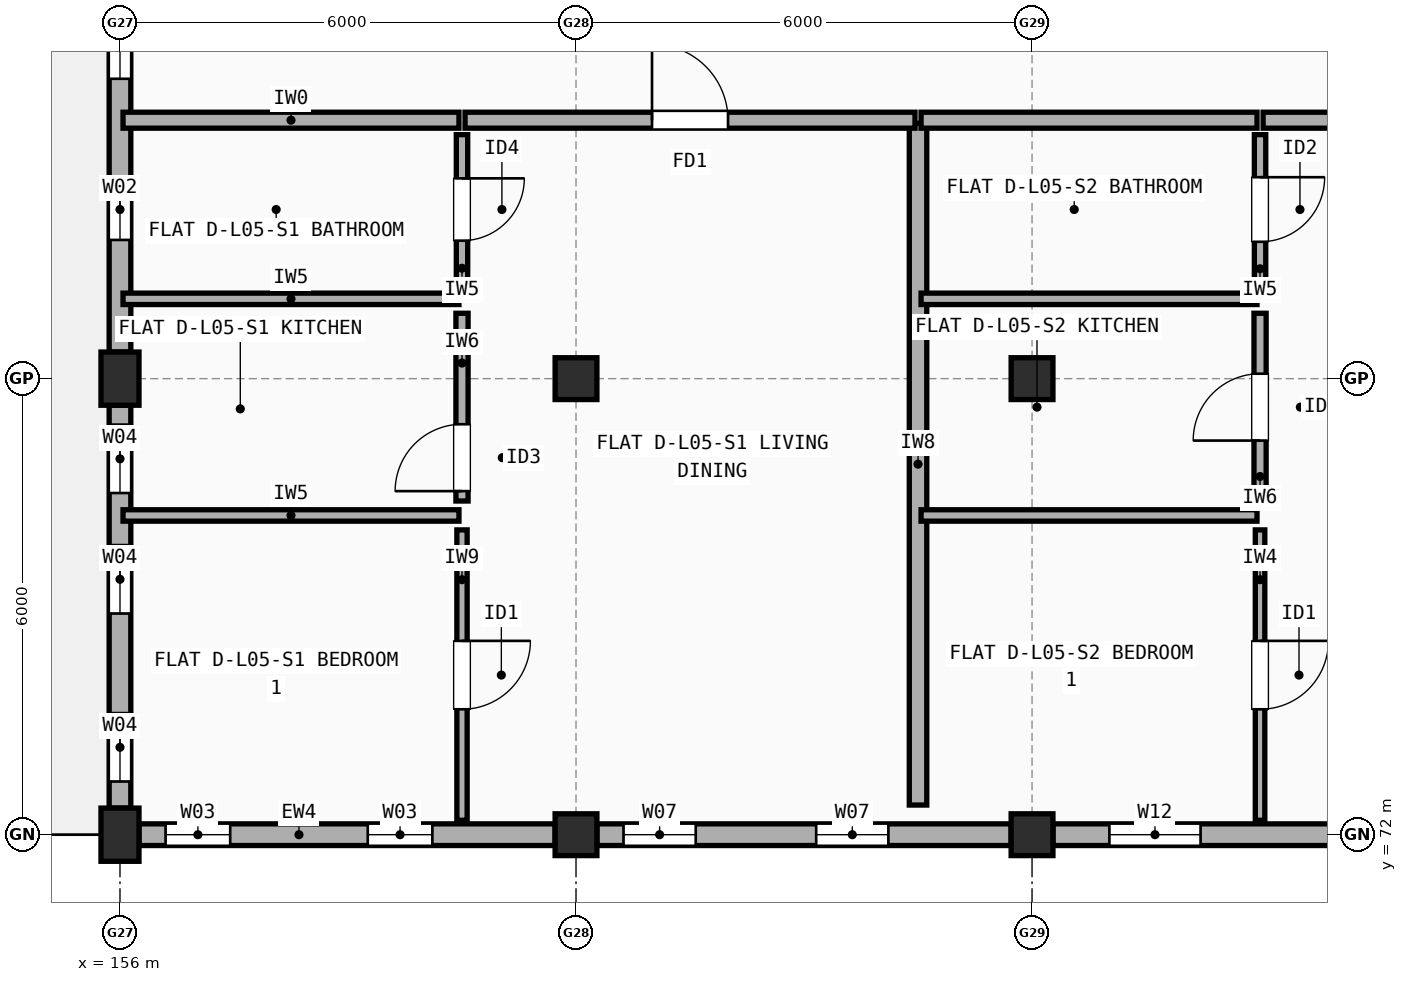
"""IFC4 building model, lengths in metres.
Left out: names, types, materials, properties, quantities, classifications, styles, units other than length and angle.
Written with IfcOpenShell. Run it as: python <this file> out.ifc"""

import sys

from ifc_helpers import new_model, si_unit, direction, frame, frame_2d, origin, origin_2d, place, context, subcontext, project, spatial, rectangle, extrude, element, fill, save


model = new_model("IFC4")
c1 = context("Model", 3, precision=1e-05, world=origin(), true_north=direction((0.0, 1.0)))
c2 = subcontext(c1, "Body", "Model", "MODEL_VIEW")
j1 = project(units=[si_unit("LENGTHUNIT", "METRE"), si_unit("PLANEANGLEUNIT", "RADIAN")], contexts=[c1])
p1 = place(None, origin())
s1 = spatial("IfcSite", under=j1, at=p1, CompositionType="ELEMENT")
p2 = place(p1, origin())
s2 = spatial("IfcBuilding", under=s1, at=p2, CompositionType="ELEMENT")
p3 = place(p2, frame((0.0, 0.0, 17.3)))
s3 = spatial("IfcBuildingStorey", under=s2, at=p3, CompositionType="ELEMENT", Elevation=17.3)
for number, where, z_axis, x_axis in (
    (1, (156.0, 72.0, 0.0), (0.0, 0.0, 1.0), (1.0, 0.0, 0.0)),
    (2, (156.0, 78.0, 0.0), (0.0, 0.0, 1.0), (1.0, 0.0, 0.0)),
):
    element("IfcColumn", number, at=place(p3, frame(where, z_axis=z_axis, x_axis=x_axis)), inside=s3, PredefinedType="COLUMN", context=c2, shape_type="SweptSolid", body=[
        extrude(rectangle(XDim=0.5, YDim=0.7, at=origin_2d()), origin(), (0.0, 0.0, 1.0), 2.965),
    ])
for number, where, z_axis, x_axis in (
    (3, (162.0, 72.0, 0.0), (0.0, 0.0, 1.0), (1.0, 0.0, 0.0)),
    (4, (162.0, 78.0, 0.0), (0.0, 0.0, 1.0), (1.0, 0.0, 0.0)),
    (5, (168.0, 72.0, 0.0), (0.0, 0.0, 1.0), (1.0, 0.0, 0.0)),
    (6, (168.0, 78.0, 0.0), (0.0, 0.0, 1.0), (1.0, 0.0, 0.0)),
):
    element("IfcColumn", number, at=place(p3, frame(where, z_axis=z_axis, x_axis=x_axis)), inside=s3, PredefinedType="COLUMN", context=c2, shape_type="SweptSolid", body=[
        extrude(rectangle(XDim=0.55, YDim=0.55, at=origin_2d()), origin(), (0.0, 0.0, 1.0), 2.965),
    ])
p4 = place(p3, frame((156.25, 72.0, 0.0), z_axis=(0.0, 0.0, 1.0), x_axis=(1.0, 0.0, 0.0)))
e7 = element("IfcWall", 7, at=p4, inside=s3, PredefinedType="STANDARD", context=c2, shape_type="SweptSolid", body=[
    extrude(rectangle(XDim=5.475, YDim=0.285, at=frame_2d((2.738, 0.0))), origin(), (0.0, 0.0, 1.0), 2.447),
])
p5 = place(p4, frame((0.35, 0.0, 0.9)))
e8 = element("IfcOpeningElement", 8, at=p5, cuts=e7, PredefinedType="OPENING", context=c2, shape_type="SweptSolid", body=[
    extrude(rectangle(XDim=0.85, YDim=1.25, at=frame_2d((0.425, 0.625))), frame((0.0, 0.152, 0.0), z_axis=(0.0, -1.0, 0.0), x_axis=(1.0, 0.0, 0.0)), (0.0, 0.0, 1.0), 0.305),
])
p6 = place(p4, frame((3.01, 0.0, 0.9)))
e9 = element("IfcOpeningElement", 9, at=p6, cuts=e7, PredefinedType="OPENING", context=c2, shape_type="SweptSolid", body=[
    extrude(rectangle(XDim=0.85, YDim=1.25, at=frame_2d((0.425, 0.625))), frame((0.0, 0.152, 0.0), z_axis=(0.0, -1.0, 0.0), x_axis=(1.0, 0.0, 0.0)), (0.0, 0.0, 1.0), 0.305),
])
p7 = place(p3, frame((162.275, 72.0, 0.0), z_axis=(0.0, 0.0, 1.0), x_axis=(1.0, 0.0, 0.0)))
e10 = element("IfcWall", 10, at=p7, inside=s3, PredefinedType="STANDARD", context=c2, shape_type="SweptSolid", body=[
    extrude(rectangle(XDim=5.45, YDim=0.285, at=frame_2d((2.725, 0.0))), origin(), (0.0, 0.0, 1.0), 2.447),
])
p8 = place(p7, frame((0.35, 0.0, 0.9)))
e11 = element("IfcOpeningElement", 11, at=p8, cuts=e10, PredefinedType="OPENING", context=c2, shape_type="SweptSolid", body=[
    extrude(rectangle(XDim=0.95, YDim=1.35, at=frame_2d((0.475, 0.675))), frame((0.0, 0.152, 0.0), z_axis=(0.0, -1.0, 0.0), x_axis=(1.0, 0.0, 0.0)), (0.0, 0.0, 1.0), 0.305),
])
p9 = place(p7, frame((2.885, 0.0, 0.9)))
e12 = element("IfcOpeningElement", 12, at=p9, cuts=e10, PredefinedType="OPENING", context=c2, shape_type="SweptSolid", body=[
    extrude(rectangle(XDim=0.95, YDim=1.35, at=frame_2d((0.475, 0.675))), frame((0.0, 0.152, 0.0), z_axis=(0.0, -1.0, 0.0), x_axis=(1.0, 0.0, 0.0)), (0.0, 0.0, 1.0), 0.305),
])
p10 = place(p3, frame((168.275, 72.0, 0.0), z_axis=(0.0, 0.0, 1.0), x_axis=(1.0, 0.0, 0.0)))
e13 = element("IfcWall", 13, at=p10, inside=s3, PredefinedType="STANDARD", context=c2, shape_type="SweptSolid", body=[
    extrude(rectangle(XDim=5.45, YDim=0.285, at=frame_2d((2.725, 0.0))), origin(), (0.0, 0.0, 1.0), 2.447),
])
p11 = place(p10, frame((0.742, 0.0, 0.9)))
e14 = element("IfcOpeningElement", 14, at=p11, cuts=e13, PredefinedType="OPENING", context=c2, shape_type="SweptSolid", body=[
    extrude(rectangle(XDim=1.2, YDim=1.35, at=frame_2d((0.6, 0.675))), frame((0.0, 0.152, 0.0), z_axis=(0.0, -1.0, 0.0), x_axis=(1.0, 0.0, 0.0)), (0.0, 0.0, 1.0), 0.305),
])
p12 = place(p10, frame((3.708, 0.0, 0.9)))
e15 = element("IfcOpeningElement", 15, at=p12, cuts=e13, PredefinedType="OPENING", context=c2, shape_type="SweptSolid", body=[
    extrude(rectangle(XDim=0.8, YDim=1.2, at=frame_2d((0.4, 0.6))), frame((0.0, 0.152, 0.0), z_axis=(0.0, -1.0, 0.0), x_axis=(1.0, 0.0, 0.0)), (0.0, 0.0, 1.0), 0.305),
])
p13 = place(p3, frame((156.0, 83.65, 0.0), z_axis=(0.0, 0.0, 1.0), x_axis=(0.0, -1.0, 0.0)))
e16 = element("IfcWall", 16, at=p13, inside=s3, PredefinedType="STANDARD", context=c2, shape_type="SweptSolid", body=[
    extrude(rectangle(XDim=5.3, YDim=0.285, at=frame_2d((2.65, 0.0))), origin(), (0.0, 0.0, 1.0), 2.447),
])
p14 = place(p13, frame((0.505, 0.0, 0.9)))
e17 = element("IfcOpeningElement", 17, at=p14, cuts=e16, PredefinedType="OPENING", context=c2, shape_type="SweptSolid", body=[
    extrude(rectangle(XDim=1.2, YDim=1.35, at=frame_2d((0.6, 0.675))), frame((0.0, 0.152, 0.0), z_axis=(0.0, -1.0, 0.0), x_axis=(1.0, 0.0, 0.0)), (0.0, 0.0, 1.0), 0.305),
])
p15 = place(p13, frame((3.025, 0.0, 0.9)))
e18 = element("IfcOpeningElement", 18, at=p15, cuts=e16, PredefinedType="OPENING", context=c2, shape_type="SweptSolid", body=[
    extrude(rectangle(XDim=0.8, YDim=1.2, at=frame_2d((0.4, 0.6))), frame((0.0, 0.152, 0.0), z_axis=(0.0, -1.0, 0.0), x_axis=(1.0, 0.0, 0.0)), (0.0, 0.0, 1.0), 0.305),
])
p16 = place(p3, frame((156.0, 77.65, 0.0), z_axis=(0.0, 0.0, 1.0), x_axis=(0.0, -1.0, 0.0)))
e19 = element("IfcWall", 19, at=p16, inside=s3, PredefinedType="STANDARD", context=c2, shape_type="SweptSolid", body=[
    extrude(rectangle(XDim=5.3, YDim=0.285, at=frame_2d((2.65, 0.0))), origin(), (0.0, 0.0, 1.0), 2.447),
])
p17 = place(p16, frame((0.255, 0.0, 0.9)))
e20 = element("IfcOpeningElement", 20, at=p17, cuts=e19, PredefinedType="OPENING", context=c2, shape_type="SweptSolid", body=[
    extrude(rectangle(XDim=0.9, YDim=1.3, at=frame_2d((0.45, 0.65))), frame((0.0, 0.152, 0.0), z_axis=(0.0, -1.0, 0.0), x_axis=(1.0, 0.0, 0.0)), (0.0, 0.0, 1.0), 0.305),
])
p18 = place(p16, frame((1.84, 0.0, 0.9)))
e21 = element("IfcOpeningElement", 21, at=p18, cuts=e19, PredefinedType="OPENING", context=c2, shape_type="SweptSolid", body=[
    extrude(rectangle(XDim=0.9, YDim=1.3, at=frame_2d((0.45, 0.65))), frame((0.0, 0.152, 0.0), z_axis=(0.0, -1.0, 0.0), x_axis=(1.0, 0.0, 0.0)), (0.0, 0.0, 1.0), 0.305),
])
p19 = place(p16, frame((4.05, 0.0, 0.9)))
e22 = element("IfcOpeningElement", 22, at=p19, cuts=e19, PredefinedType="OPENING", context=c2, shape_type="SweptSolid", body=[
    extrude(rectangle(XDim=0.9, YDim=1.3, at=frame_2d((0.45, 0.65))), frame((0.0, 0.152, 0.0), z_axis=(0.0, -1.0, 0.0), x_axis=(1.0, 0.0, 0.0)), (0.0, 0.0, 1.0), 0.305),
])
p20 = place(p3, frame((166.5, 72.39, 0.0), z_axis=(0.0, 0.0, 1.0), x_axis=(0.0, 1.0, 0.0)))
e23 = element("IfcWall", 23, at=p20, inside=s3, PredefinedType="SOLIDWALL", context=c2, shape_type="SweptSolid", body=[
    extrude(rectangle(XDim=8.97, YDim=0.23, at=frame_2d((4.485, 0.0))), origin(), (0.0, 0.0, 1.0), 2.447),
])
p21 = place(p3, frame((156.04, 81.4, 0.0), z_axis=(0.0, 0.0, 1.0), x_axis=(1.0, 0.0, 0.0)))
e24 = element("IfcWall", 24, at=p21, inside=s3, PredefinedType="SOLIDWALL", context=c2, shape_type="SweptSolid", body=[
    extrude(rectangle(XDim=4.42, YDim=0.21, at=frame_2d((2.21, 0.0))), origin(), (0.0, 0.0, 1.0), 2.447),
])
p22 = place(p3, frame((160.54, 81.4, 0.0), z_axis=(0.0, 0.0, 1.0), x_axis=(1.0, 0.0, 0.0)))
e25 = element("IfcWall", 25, at=p22, inside=s3, PredefinedType="SOLIDWALL", context=c2, shape_type="SweptSolid", body=[
    extrude(rectangle(XDim=5.92, YDim=0.21, at=frame_2d((2.96, 0.0))), origin(), (0.0, 0.0, 1.0), 2.548),
])
p23 = place(p22, frame((2.46, 0.0, 0.0)))
e26 = element("IfcOpeningElement", 26, at=p23, cuts=e25, PredefinedType="OPENING", context=c2, shape_type="SweptSolid", body=[
    extrude(rectangle(XDim=1.0, YDim=2.15, at=frame_2d((0.5, 1.075))), frame((0.0, 0.115, 0.0), z_axis=(0.0, -1.0, 0.0), x_axis=(1.0, 0.0, 0.0)), (0.0, 0.0, 1.0), 0.23),
])
p24 = place(p3, frame((160.5, 72.19, 0.0), z_axis=(0.0, 0.0, 1.0), x_axis=(0.0, 1.0, 0.0)))
e27 = element("IfcWall", 27, at=p24, inside=s3, PredefinedType="PARTITIONING", context=c2, shape_type="SweptSolid", body=[
    extrude(rectangle(XDim=3.82, YDim=0.135, at=frame_2d((1.91, 0.0))), origin(), (0.0, 0.0, 1.0), 2.965),
])
p25 = place(p24, frame((1.46, 0.0, 0.0)))
e28 = element("IfcOpeningElement", 28, at=p25, cuts=e27, PredefinedType="OPENING", context=c2, shape_type="SweptSolid", body=[
    extrude(rectangle(XDim=0.9, YDim=2.1, at=frame_2d((0.45, 1.05))), frame((0.0, 0.077, 0.0), z_axis=(0.0, -1.0, 0.0), x_axis=(1.0, 0.0, 0.0)), (0.0, 0.0, 1.0), 0.155),
])
p26 = place(p3, frame((160.5, 76.39, 0.0), z_axis=(0.0, 0.0, 1.0), x_axis=(0.0, 1.0, 0.0)))
e29 = element("IfcWall", 29, at=p26, inside=s3, PredefinedType="PLUMBINGWALL", context=c2, shape_type="SweptSolid", body=[
    extrude(rectangle(XDim=2.47, YDim=0.16, at=frame_2d((1.235, 0.0))), origin(), (0.0, 0.0, 1.0), 2.447),
])
p27 = place(p26, frame((0.13, 0.0, 0.0)))
e30 = element("IfcOpeningElement", 30, at=p27, cuts=e29, PredefinedType="OPENING", context=c2, shape_type="SweptSolid", body=[
    extrude(rectangle(XDim=0.88, YDim=2.1, at=frame_2d((0.44, 1.05))), frame((0.0, 0.09, 0.0), z_axis=(0.0, -1.0, 0.0), x_axis=(1.0, 0.0, 0.0)), (0.0, 0.0, 1.0), 0.18),
])
p28 = place(p3, frame((160.5, 79.24, 0.0), z_axis=(0.0, 0.0, 1.0), x_axis=(0.0, 1.0, 0.0)))
e31 = element("IfcWall", 31, at=p28, inside=s3, PredefinedType="PARTITIONING", context=c2, shape_type="SweptSolid", body=[
    extrude(rectangle(XDim=1.97, YDim=0.15, at=frame_2d((0.985, 0.0))), origin(), (0.0, 0.0, 1.0), 2.965),
])
p29 = place(p28, frame((0.575, 0.0, 0.0)))
e32 = element("IfcOpeningElement", 32, at=p29, cuts=e31, PredefinedType="OPENING", context=c2, shape_type="SweptSolid", body=[
    extrude(rectangle(XDim=0.82, YDim=2.08, at=frame_2d((0.41, 1.04))), frame((0.0, 0.085, 0.0), z_axis=(0.0, -1.0, 0.0), x_axis=(1.0, 0.0, 0.0)), (0.0, 0.0, 1.0), 0.17),
])
for number, where, z_axis, x_axis in (
    (33, (156.04, 76.2, 0.0), (0.0, 0.0, 1.0), (1.0, 0.0, 0.0)),
    (34, (156.04, 79.05, 0.0), (0.0, 0.0, 1.0), (1.0, 0.0, 0.0)),
):
    element("IfcWall", number, at=place(p3, frame(where, z_axis=z_axis, x_axis=x_axis)), inside=s3, PredefinedType="PARTITIONING", context=c2, shape_type="SweptSolid", body=[
        extrude(rectangle(XDim=4.42, YDim=0.15, at=frame_2d((2.21, 0.0))), origin(), (0.0, 0.0, 1.0), 2.447),
    ])
p30 = place(p3, frame((166.54, 81.4, 0.0), z_axis=(0.0, 0.0, 1.0), x_axis=(1.0, 0.0, 0.0)))
e35 = element("IfcWall", 35, at=p30, inside=s3, PredefinedType="SOLIDWALL", context=c2, shape_type="SweptSolid", body=[
    extrude(rectangle(XDim=4.42, YDim=0.21, at=frame_2d((2.21, 0.0))), origin(), (0.0, 0.0, 1.0), 2.548),
])
p31 = place(p3, frame((171.04, 81.4, 0.0), z_axis=(0.0, 0.0, 1.0), x_axis=(1.0, 0.0, 0.0)))
e36 = element("IfcWall", 36, at=p31, inside=s3, PredefinedType="SOLIDWALL", context=c2, shape_type="SweptSolid", body=[
    extrude(rectangle(XDim=5.92, YDim=0.21, at=frame_2d((2.96, 0.0))), origin(), (0.0, 0.0, 1.0), 2.508),
])
p32 = place(p31, frame((2.47, 0.0, 0.0)))
e37 = element("IfcOpeningElement", 37, at=p32, cuts=e36, PredefinedType="OPENING", context=c2, shape_type="SweptSolid", body=[
    extrude(rectangle(XDim=0.98, YDim=2.15, at=frame_2d((0.49, 1.075))), frame((0.0, 0.115, 0.0), z_axis=(0.0, -1.0, 0.0), x_axis=(1.0, 0.0, 0.0)), (0.0, 0.0, 1.0), 0.23),
])
p33 = place(p3, frame((171.0, 72.19, 0.0), z_axis=(0.0, 0.0, 1.0), x_axis=(0.0, 1.0, 0.0)))
e38 = element("IfcWall", 38, at=p33, inside=s3, PredefinedType="PARTITIONING", context=c2, shape_type="SweptSolid", body=[
    extrude(rectangle(XDim=3.82, YDim=0.125, at=frame_2d((1.91, 0.0))), origin(), (0.0, 0.0, 1.0), 2.965),
])
p34 = place(p33, frame((1.46, 0.0, 0.0)))
e39 = element("IfcOpeningElement", 39, at=p34, cuts=e38, PredefinedType="OPENING", context=c2, shape_type="SweptSolid", body=[
    extrude(rectangle(XDim=0.9, YDim=2.1, at=frame_2d((0.45, 1.05))), frame((0.0, 0.073, 0.0), z_axis=(0.0, -1.0, 0.0), x_axis=(1.0, 0.0, 0.0)), (0.0, 0.0, 1.0), 0.145),
])
p35 = place(p3, frame((171.0, 76.39, 0.0), z_axis=(0.0, 0.0, 1.0), x_axis=(0.0, 1.0, 0.0)))
e40 = element("IfcWall", 40, at=p35, inside=s3, PredefinedType="PLUMBINGWALL", context=c2, shape_type="SweptSolid", body=[
    extrude(rectangle(XDim=2.47, YDim=0.16, at=frame_2d((1.235, 0.0))), origin(), (0.0, 0.0, 1.0), 2.447),
])
p36 = place(p35, frame((0.795, 0.0, 0.0)))
e41 = element("IfcOpeningElement", 41, at=p36, cuts=e40, PredefinedType="OPENING", context=c2, shape_type="SweptSolid", body=[
    extrude(rectangle(XDim=0.88, YDim=2.1, at=frame_2d((0.44, 1.05))), frame((0.0, 0.09, 0.0), z_axis=(0.0, -1.0, 0.0), x_axis=(1.0, 0.0, 0.0)), (0.0, 0.0, 1.0), 0.18),
])
p37 = place(p3, frame((171.0, 79.24, 0.0), z_axis=(0.0, 0.0, 1.0), x_axis=(0.0, 1.0, 0.0)))
e42 = element("IfcWall", 42, at=p37, inside=s3, PredefinedType="PARTITIONING", context=c2, shape_type="SweptSolid", body=[
    extrude(rectangle(XDim=1.97, YDim=0.15, at=frame_2d((0.985, 0.0))), origin(), (0.0, 0.0, 1.0), 2.965),
])
p38 = place(p37, frame((0.56, 0.0, 0.0)))
e43 = element("IfcOpeningElement", 43, at=p38, cuts=e42, PredefinedType="OPENING", context=c2, shape_type="SweptSolid", body=[
    extrude(rectangle(XDim=0.85, YDim=2.1, at=frame_2d((0.425, 1.05))), frame((0.0, 0.085, 0.0), z_axis=(0.0, -1.0, 0.0), x_axis=(1.0, 0.0, 0.0)), (0.0, 0.0, 1.0), 0.17),
])
p39 = place(p3, frame((166.54, 76.2, 0.0), z_axis=(0.0, 0.0, 1.0), x_axis=(1.0, 0.0, 0.0)))
e44 = element("IfcWall", 44, at=p39, inside=s3, PredefinedType="PARTITIONING", context=c2, shape_type="SweptSolid", body=[
    extrude(rectangle(XDim=4.42, YDim=0.15, at=frame_2d((2.21, 0.0))), origin(), (0.0, 0.0, 1.0), 2.458),
])
p40 = place(p3, frame((166.54, 79.05, 0.0), z_axis=(0.0, 0.0, 1.0), x_axis=(1.0, 0.0, 0.0)))
e45 = element("IfcWall", 45, at=p40, inside=s3, PredefinedType="PARTITIONING", context=c2, shape_type="SweptSolid", body=[
    extrude(rectangle(XDim=4.42, YDim=0.15, at=frame_2d((2.21, 0.0))), origin(), (0.0, 0.0, 1.0), 2.548),
])
p41 = place(p5, origin())
e46 = element("IfcWindow", 46, at=p41, inside=s3, PartitioningType="SINGLE_PANEL", PredefinedType="WINDOW", context=c2, shape_type="SweptSolid", body=[
    extrude(rectangle(XDim=0.85, YDim=1.25, at=frame_2d((0.425, 0.625))), frame((0.0, 0.03, 0.0), z_axis=(0.0, -1.0, 0.0), x_axis=(1.0, 0.0, 0.0)), (0.0, 0.0, 1.0), 0.06),
])
fill(e8, e46)
p42 = place(p6, origin())
e47 = element("IfcWindow", 47, at=p42, inside=s3, PartitioningType="SINGLE_PANEL", PredefinedType="WINDOW", context=c2, shape_type="SweptSolid", body=[
    extrude(rectangle(XDim=0.85, YDim=1.25, at=frame_2d((0.425, 0.625))), frame((0.0, 0.03, 0.0), z_axis=(0.0, -1.0, 0.0), x_axis=(1.0, 0.0, 0.0)), (0.0, 0.0, 1.0), 0.06),
])
fill(e9, e47)
p43 = place(p8, origin())
e48 = element("IfcWindow", 48, at=p43, inside=s3, PartitioningType="SINGLE_PANEL", PredefinedType="WINDOW", context=c2, shape_type="SweptSolid", body=[
    extrude(rectangle(XDim=0.95, YDim=1.35, at=frame_2d((0.475, 0.675))), frame((0.0, 0.03, 0.0), z_axis=(0.0, -1.0, 0.0), x_axis=(1.0, 0.0, 0.0)), (0.0, 0.0, 1.0), 0.06),
])
fill(e11, e48)
p44 = place(p9, origin())
e49 = element("IfcWindow", 49, at=p44, inside=s3, PartitioningType="SINGLE_PANEL", PredefinedType="WINDOW", context=c2, shape_type="SweptSolid", body=[
    extrude(rectangle(XDim=0.95, YDim=1.35, at=frame_2d((0.475, 0.675))), frame((0.0, 0.03, 0.0), z_axis=(0.0, -1.0, 0.0), x_axis=(1.0, 0.0, 0.0)), (0.0, 0.0, 1.0), 0.06),
])
fill(e12, e49)
p45 = place(p11, origin())
e50 = element("IfcWindow", 50, at=p45, inside=s3, PartitioningType="SINGLE_PANEL", PredefinedType="WINDOW", context=c2, shape_type="SweptSolid", body=[
    extrude(rectangle(XDim=1.2, YDim=1.35, at=frame_2d((0.6, 0.675))), frame((0.0, 0.03, 0.0), z_axis=(0.0, -1.0, 0.0), x_axis=(1.0, 0.0, 0.0)), (0.0, 0.0, 1.0), 0.06),
])
fill(e14, e50)
p46 = place(p14, origin())
e51 = element("IfcWindow", 51, at=p46, inside=s3, PartitioningType="SINGLE_PANEL", PredefinedType="WINDOW", context=c2, shape_type="SweptSolid", body=[
    extrude(rectangle(XDim=1.2, YDim=1.35, at=frame_2d((0.6, 0.675))), frame((0.0, 0.03, 0.0), z_axis=(0.0, -1.0, 0.0), x_axis=(1.0, 0.0, 0.0)), (0.0, 0.0, 1.0), 0.06),
])
fill(e17, e51)
p47 = place(p15, origin())
e52 = element("IfcWindow", 52, at=p47, inside=s3, PartitioningType="SINGLE_PANEL", PredefinedType="WINDOW", context=c2, shape_type="SweptSolid", body=[
    extrude(rectangle(XDim=0.8, YDim=1.2, at=frame_2d((0.4, 0.6))), frame((0.0, 0.03, 0.0), z_axis=(0.0, -1.0, 0.0), x_axis=(1.0, 0.0, 0.0)), (0.0, 0.0, 1.0), 0.06),
])
fill(e18, e52)
p48 = place(p17, origin())
e53 = element("IfcWindow", 53, at=p48, inside=s3, PartitioningType="SINGLE_PANEL", PredefinedType="WINDOW", context=c2, shape_type="SweptSolid", body=[
    extrude(rectangle(XDim=0.9, YDim=1.3, at=frame_2d((0.45, 0.65))), frame((0.0, 0.03, 0.0), z_axis=(0.0, -1.0, 0.0), x_axis=(1.0, 0.0, 0.0)), (0.0, 0.0, 1.0), 0.06),
])
fill(e20, e53)
p49 = place(p18, origin())
e54 = element("IfcWindow", 54, at=p49, inside=s3, PartitioningType="SINGLE_PANEL", PredefinedType="WINDOW", context=c2, shape_type="SweptSolid", body=[
    extrude(rectangle(XDim=0.9, YDim=1.3, at=frame_2d((0.45, 0.65))), frame((0.0, 0.03, 0.0), z_axis=(0.0, -1.0, 0.0), x_axis=(1.0, 0.0, 0.0)), (0.0, 0.0, 1.0), 0.06),
])
fill(e21, e54)
p50 = place(p19, origin())
e55 = element("IfcWindow", 55, at=p50, inside=s3, PartitioningType="SINGLE_PANEL", PredefinedType="WINDOW", context=c2, shape_type="SweptSolid", body=[
    extrude(rectangle(XDim=0.9, YDim=1.3, at=frame_2d((0.45, 0.65))), frame((0.0, 0.03, 0.0), z_axis=(0.0, -1.0, 0.0), x_axis=(1.0, 0.0, 0.0)), (0.0, 0.0, 1.0), 0.06),
])
fill(e22, e55)
p51 = place(p23, origin())
e56 = element("IfcDoor", 56, at=p51, inside=s3, OperationType="SINGLE_SWING_LEFT", PredefinedType="DOOR", context=c2, shape_type="SweptSolid", body=[
    extrude(rectangle(XDim=1.0, YDim=2.15, at=frame_2d((0.5, 1.075))), frame((0.0, 0.025, 0.0), z_axis=(0.0, -1.0, 0.0), x_axis=(1.0, 0.0, 0.0)), (0.0, 0.0, 1.0), 0.05),
])
fill(e26, e56)
p52 = place(p25, origin())
e57 = element("IfcDoor", 57, at=p52, inside=s3, OperationType="SINGLE_SWING_RIGHT", PredefinedType="DOOR", context=c2, shape_type="SweptSolid", body=[
    extrude(rectangle(XDim=0.9, YDim=2.1, at=frame_2d((0.45, 1.05))), frame((0.0, 0.025, 0.0), z_axis=(0.0, -1.0, 0.0), x_axis=(1.0, 0.0, 0.0)), (0.0, 0.0, 1.0), 0.05),
])
fill(e28, e57)
p53 = place(p27, origin())
e58 = element("IfcDoor", 58, at=p53, inside=s3, OperationType="SINGLE_SWING_LEFT", PredefinedType="DOOR", context=c2, shape_type="SweptSolid", body=[
    extrude(rectangle(XDim=0.88, YDim=2.1, at=frame_2d((0.44, 1.05))), frame((0.0, 0.025, 0.0), z_axis=(0.0, -1.0, 0.0), x_axis=(1.0, 0.0, 0.0)), (0.0, 0.0, 1.0), 0.05),
])
fill(e30, e58)
p54 = place(p29, origin())
e59 = element("IfcDoor", 59, at=p54, inside=s3, OperationType="SINGLE_SWING_RIGHT", PredefinedType="DOOR", context=c2, shape_type="SweptSolid", body=[
    extrude(rectangle(XDim=0.82, YDim=2.08, at=frame_2d((0.41, 1.04))), frame((0.0, 0.025, 0.0), z_axis=(0.0, -1.0, 0.0), x_axis=(1.0, 0.0, 0.0)), (0.0, 0.0, 1.0), 0.05),
])
fill(e32, e59)
p55 = place(p34, origin())
e60 = element("IfcDoor", 60, at=p55, inside=s3, OperationType="SINGLE_SWING_RIGHT", PredefinedType="DOOR", context=c2, shape_type="SweptSolid", body=[
    extrude(rectangle(XDim=0.9, YDim=2.1, at=frame_2d((0.45, 1.05))), frame((0.0, 0.025, 0.0), z_axis=(0.0, -1.0, 0.0), x_axis=(1.0, 0.0, 0.0)), (0.0, 0.0, 1.0), 0.05),
])
fill(e39, e60)
p56 = place(p36, origin())
e61 = element("IfcDoor", 61, at=p56, inside=s3, OperationType="SINGLE_SWING_LEFT", PredefinedType="DOOR", context=c2, shape_type="SweptSolid", body=[
    extrude(rectangle(XDim=0.88, YDim=2.1, at=frame_2d((0.44, 1.05))), frame((0.0, 0.025, 0.0), z_axis=(0.0, -1.0, 0.0), x_axis=(1.0, 0.0, 0.0)), (0.0, 0.0, 1.0), 0.05),
])
fill(e41, e61)
p57 = place(p38, origin())
e62 = element("IfcDoor", 62, at=p57, inside=s3, OperationType="SINGLE_SWING_RIGHT", PredefinedType="DOOR", context=c2, shape_type="SweptSolid", body=[
    extrude(rectangle(XDim=0.85, YDim=2.1, at=frame_2d((0.425, 1.05))), frame((0.0, 0.025, 0.0), z_axis=(0.0, -1.0, 0.0), x_axis=(1.0, 0.0, 0.0)), (0.0, 0.0, 1.0), 0.05),
])
fill(e43, e62)
save(model, sys.argv[1])
